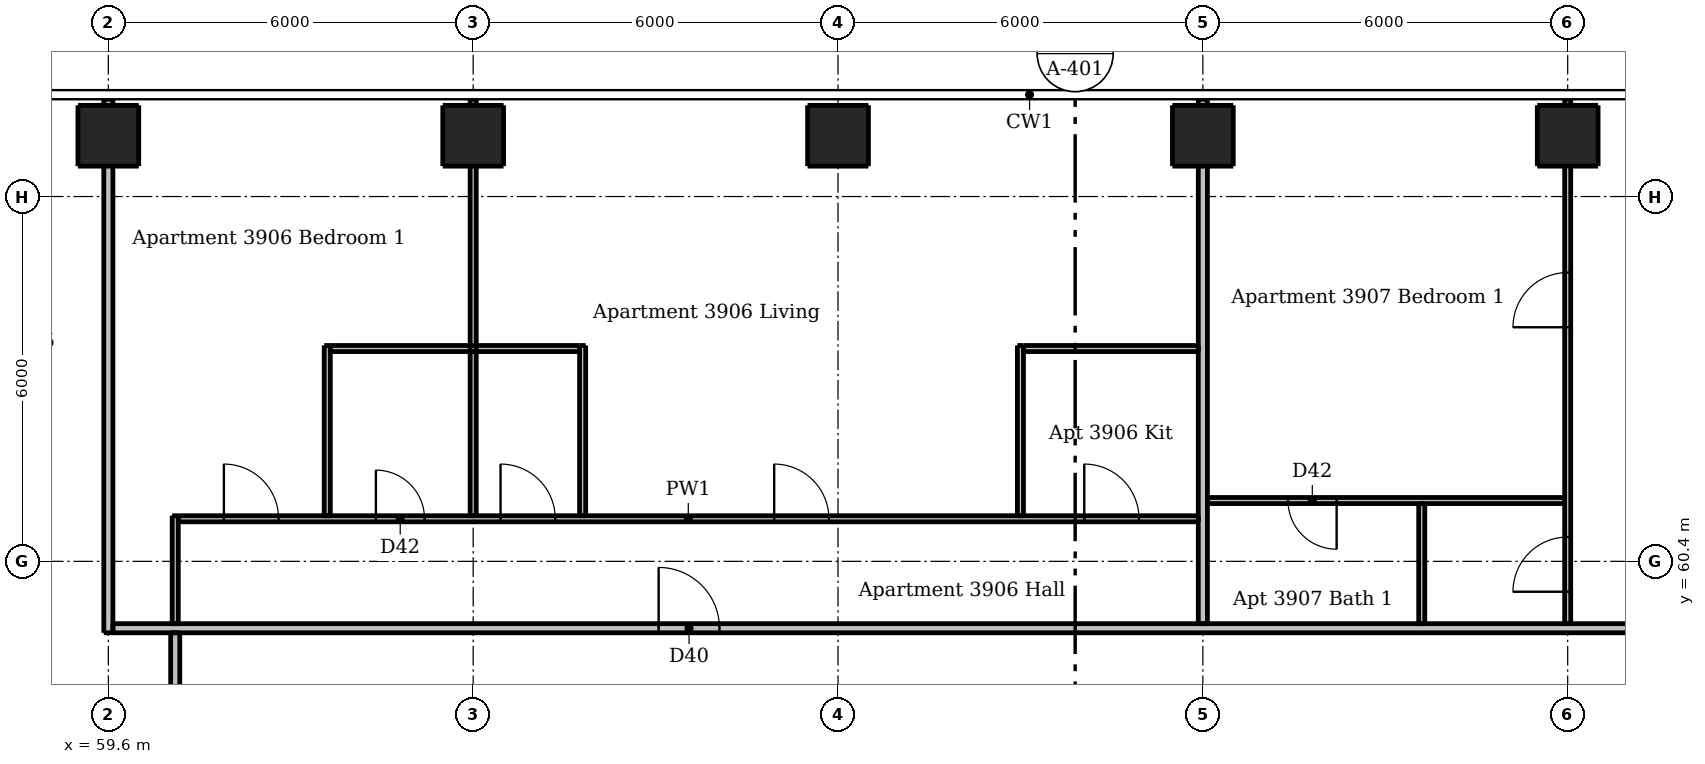
"""IFC4 building model, lengths in metres.
Left out: names, types, materials, properties, quantities, classifications, styles, units other than length and angle.
Written with IfcOpenShell. Run it as: python <this file> out.ifc"""

import sys

from ifc_helpers import new_model, si_unit, direction, frame, frame_2d, origin, origin_2d, place, context, subcontext, project, spatial, rectangle, extrude, element, fill, save


model = new_model("IFC4")
c1 = context("Model", 3, precision=1e-05, world=origin(), true_north=direction((0.0, 1.0)))
c2 = subcontext(c1, "Body", "Model", "MODEL_VIEW")
j1 = project(units=[si_unit("LENGTHUNIT", "METRE"), si_unit("PLANEANGLEUNIT", "RADIAN")], contexts=[c1])
p1 = place(None, origin())
s1 = spatial("IfcSite", under=j1, at=p1, CompositionType="ELEMENT")
p2 = place(p1, origin())
s2 = spatial("IfcBuilding", under=s1, at=p2, CompositionType="ELEMENT")
p3 = place(p2, frame((0.0, 0.0, 147.1)))
s3 = spatial("IfcBuildingStorey", under=s2, at=p3, CompositionType="ELEMENT", Elevation=147.1)
for number, where, z_axis, x_axis in (
    (1, (59.6, 67.4, 0.0), (0.0, 0.0, 1.0), (1.0, 0.0, 0.0)),
    (2, (65.6, 67.4, 0.0), (0.0, 0.0, 1.0), (1.0, 0.0, 0.0)),
    (3, (71.6, 67.4, 0.0), (0.0, 0.0, 1.0), (1.0, 0.0, 0.0)),
    (4, (77.6, 67.4, 0.0), (0.0, 0.0, 1.0), (1.0, 0.0, 0.0)),
    (5, (83.6, 67.4, 0.0), (0.0, 0.0, 1.0), (1.0, 0.0, 0.0)),
):
    element("IfcColumn", number, at=place(p3, frame(where, z_axis=z_axis, x_axis=x_axis)), inside=s3, PredefinedType="COLUMN", context=c2, shape_type="SweptSolid", body=[
        extrude(rectangle(XDim=1.0, YDim=1.0, at=origin_2d()), origin(), (0.0, 0.0, 1.0), 3.0),
    ])
p4 = place(p3, frame((60.7, 59.375, 0.0), z_axis=(0.0, 0.0, 1.0), x_axis=(0.0, 1.0, 0.0)))
e6 = element("IfcWall", 6, at=p4, inside=s3, PredefinedType="PARTITIONING", context=c2, shape_type="SweptSolid", body=[
    extrude(rectangle(XDim=1.775, YDim=0.1, at=frame_2d((0.887, 0.0))), origin(), (0.0, 0.0, 1.0), 3.0),
])
p5 = place(p3, frame((63.2, 61.15, 0.0), z_axis=(0.0, 0.0, 1.0), x_axis=(0.0, 1.0, 0.0)))
e7 = element("IfcWall", 7, at=p5, inside=s3, PredefinedType="PARTITIONING", context=c2, shape_type="SweptSolid", body=[
    extrude(rectangle(XDim=2.8, YDim=0.1, at=frame_2d((1.4, 0.0))), origin(), (0.0, 0.0, 1.0), 3.0),
])
p6 = place(p3, frame((65.6, 61.15, 0.0), z_axis=(0.0, 0.0, 1.0), x_axis=(0.0, 1.0, 0.0)))
e8 = element("IfcWall", 8, at=p6, inside=s3, PredefinedType="PARTITIONING", context=c2, shape_type="SweptSolid", body=[
    extrude(rectangle(XDim=6.85, YDim=0.1, at=frame_2d((3.425, 0.0))), origin(), (0.0, 0.0, 1.0), 2.466),
])
for number, where, z_axis, x_axis in (
    (9, (67.4, 61.15, 0.0), (0.0, 0.0, 1.0), (0.0, 1.0, 0.0)),
    (10, (74.6, 61.15, 0.0), (0.0, 0.0, 1.0), (0.0, 1.0, 0.0)),
):
    element("IfcWall", number, at=place(p3, frame(where, z_axis=z_axis, x_axis=x_axis)), inside=s3, PredefinedType="PARTITIONING", context=c2, shape_type="SweptSolid", body=[
        extrude(rectangle(XDim=2.8, YDim=0.1, at=frame_2d((1.4, 0.0))), origin(), (0.0, 0.0, 1.0), 3.0),
    ])
p7 = place(p3, frame((81.2, 59.375, 0.0), z_axis=(0.0, 0.0, 1.0), x_axis=(0.0, 1.0, 0.0)))
e11 = element("IfcWall", 11, at=p7, inside=s3, PredefinedType="PARTITIONING", context=c2, shape_type="SweptSolid", body=[
    extrude(rectangle(XDim=1.975, YDim=0.1, at=frame_2d((0.988, 0.0))), origin(), (0.0, 0.0, 1.0), 3.0),
])
p8 = place(p3, frame((83.6, 59.375, 0.0), z_axis=(0.0, 0.0, 1.0), x_axis=(0.0, 1.0, 0.0)))
e12 = element("IfcWall", 12, at=p8, inside=s3, PredefinedType="PARTITIONING", context=c2, shape_type="SweptSolid", body=[
    extrude(rectangle(XDim=8.625, YDim=0.1, at=frame_2d((4.312, 0.0))), origin(), (0.0, 0.0, 1.0), 2.466),
])
p9 = place(p8, frame((0.525, 0.0, 0.0)))
e13 = element("IfcOpeningElement", 13, at=p9, cuts=e12, PredefinedType="OPENING", context=c2, shape_type="SweptSolid", body=[
    extrude(rectangle(XDim=0.9, YDim=2.1, at=frame_2d((0.45, 1.05))), frame((0.0, 0.06, 0.0), z_axis=(0.0, -1.0, 0.0), x_axis=(1.0, 0.0, 0.0)), (0.0, 0.0, 1.0), 0.12),
])
p10 = place(p8, frame((4.875, 0.0, 0.0)))
e14 = element("IfcOpeningElement", 14, at=p10, cuts=e12, PredefinedType="OPENING", context=c2, shape_type="SweptSolid", body=[
    extrude(rectangle(XDim=0.9, YDim=2.1, at=frame_2d((0.45, 1.05))), frame((0.0, 0.06, 0.0), z_axis=(0.0, -1.0, 0.0), x_axis=(1.0, 0.0, 0.0)), (0.0, 0.0, 1.0), 0.12),
])
p11 = place(p3, frame((63.25, 63.9, 0.0), z_axis=(0.0, 0.0, 1.0), x_axis=(1.0, 0.0, 0.0)))
e15 = element("IfcWall", 15, at=p11, inside=s3, PredefinedType="PARTITIONING", context=c2, shape_type="SweptSolid", body=[
    extrude(rectangle(XDim=4.1, YDim=0.1, at=frame_2d((2.05, 0.0))), origin(), (0.0, 0.0, 1.0), 3.0),
])
p12 = place(p3, frame((74.65, 63.9, 0.0), z_axis=(0.0, 0.0, 1.0), x_axis=(1.0, 0.0, 0.0)))
e16 = element("IfcWall", 16, at=p12, inside=s3, PredefinedType="PARTITIONING", context=c2, shape_type="SweptSolid", body=[
    extrude(rectangle(XDim=2.875, YDim=0.1, at=frame_2d((1.438, 0.0))), origin(), (0.0, 0.0, 1.0), 3.0),
])
p13 = place(p3, frame((83.55, 61.4, 0.0), z_axis=(0.0, 0.0, 1.0), x_axis=(-1.0, 0.0, 0.0)))
e17 = element("IfcWall", 17, at=p13, inside=s3, PredefinedType="PARTITIONING", context=c2, shape_type="SweptSolid", body=[
    extrude(rectangle(XDim=5.875, YDim=0.1, at=frame_2d((2.938, 0.0))), origin(), (0.0, 0.0, 1.0), 3.0),
])
p14 = place(p13, frame((3.75, 0.0, 0.0)))
e18 = element("IfcOpeningElement", 18, at=p14, cuts=e17, PredefinedType="OPENING", context=c2, shape_type="SweptSolid", body=[
    extrude(rectangle(XDim=0.8, YDim=2.1, at=frame_2d((0.4, 1.05))), frame((0.0, 0.06, 0.0), z_axis=(0.0, -1.0, 0.0), x_axis=(1.0, 0.0, 0.0)), (0.0, 0.0, 1.0), 0.12),
])
p15 = place(p3, frame((60.75, 61.1, 0.0), z_axis=(0.0, 0.0, 1.0), x_axis=(1.0, 0.0, 0.0)))
e19 = element("IfcWall", 19, at=p15, inside=s3, PredefinedType="PARTITIONING", context=c2, shape_type="SweptSolid", body=[
    extrude(rectangle(XDim=16.775, YDim=0.1, at=frame_2d((8.387, 0.0))), origin(), (0.0, 0.0, 1.0), 3.0),
])
p16 = place(p15, frame((9.8, 0.0, 0.0)))
e20 = element("IfcOpeningElement", 20, at=p16, cuts=e19, PredefinedType="OPENING", context=c2, shape_type="SweptSolid", body=[
    extrude(rectangle(XDim=0.9, YDim=2.1, at=frame_2d((0.45, 1.05))), frame((0.0, 0.06, 0.0), z_axis=(0.0, -1.0, 0.0), x_axis=(1.0, 0.0, 0.0)), (0.0, 0.0, 1.0), 0.12),
])
p17 = place(p15, frame((14.9, 0.0, 0.0)))
e21 = element("IfcOpeningElement", 21, at=p17, cuts=e19, PredefinedType="OPENING", context=c2, shape_type="SweptSolid", body=[
    extrude(rectangle(XDim=0.9, YDim=2.1, at=frame_2d((0.45, 1.05))), frame((0.0, 0.06, 0.0), z_axis=(0.0, -1.0, 0.0), x_axis=(1.0, 0.0, 0.0)), (0.0, 0.0, 1.0), 0.12),
])
p18 = place(p15, frame((5.3, 0.0, 0.0)))
e22 = element("IfcOpeningElement", 22, at=p18, cuts=e19, PredefinedType="OPENING", context=c2, shape_type="SweptSolid", body=[
    extrude(rectangle(XDim=0.9, YDim=2.1, at=frame_2d((0.45, 1.05))), frame((0.0, 0.06, 0.0), z_axis=(0.0, -1.0, 0.0), x_axis=(1.0, 0.0, 0.0)), (0.0, 0.0, 1.0), 0.12),
])
p19 = place(p15, frame((0.75, 0.0, 0.0)))
e23 = element("IfcOpeningElement", 23, at=p19, cuts=e19, PredefinedType="OPENING", context=c2, shape_type="SweptSolid", body=[
    extrude(rectangle(XDim=0.9, YDim=2.1, at=frame_2d((0.45, 1.05))), frame((0.0, 0.06, 0.0), z_axis=(0.0, -1.0, 0.0), x_axis=(1.0, 0.0, 0.0)), (0.0, 0.0, 1.0), 0.12),
])
p20 = place(p15, frame((3.25, 0.0, 0.0)))
e24 = element("IfcOpeningElement", 24, at=p20, cuts=e19, PredefinedType="OPENING", context=c2, shape_type="SweptSolid", body=[
    extrude(rectangle(XDim=0.8, YDim=2.1, at=frame_2d((0.4, 1.05))), frame((0.0, 0.06, 0.0), z_axis=(0.0, -1.0, 0.0), x_axis=(1.0, 0.0, 0.0)), (0.0, 0.0, 1.0), 0.12),
])
p21 = place(p3, frame((59.6, 59.225, 0.0), z_axis=(0.0, 0.0, 1.0), x_axis=(0.0, 1.0, 0.0)))
e25 = element("IfcWall", 25, at=p21, inside=s3, PredefinedType="PARTITIONING", context=c2, shape_type="SweptSolid", body=[
    extrude(rectangle(XDim=8.775, YDim=0.15, at=frame_2d((4.387, 0.0))), origin(), (0.0, 0.0, 1.0), 2.46),
])
p22 = place(p3, frame((60.7, 30.325, 0.0), z_axis=(0.0, 0.0, 1.0), x_axis=(0.0, 1.0, 0.0)))
e26 = element("IfcWall", 26, at=p22, inside=s3, PredefinedType="PARTITIONING", context=c2, shape_type="SweptSolid", body=[
    extrude(rectangle(XDim=28.9, YDim=0.15, at=frame_2d((14.45, 0.0))), origin(), (0.0, 0.0, 1.0), 3.0),
])
p23 = place(p22, frame((9.225, 0.0, 0.0)))
e27 = element("IfcOpeningElement", 27, at=p23, cuts=e26, PredefinedType="OPENING", context=c2, shape_type="SweptSolid", body=[
    extrude(rectangle(XDim=1.0, YDim=2.1, at=frame_2d((0.5, 1.05))), frame((0.0, 0.085, 0.0), z_axis=(0.0, -1.0, 0.0), x_axis=(1.0, 0.0, 0.0)), (0.0, 0.0, 1.0), 0.17),
])
p24 = place(p22, frame((26.025, 0.0, 0.0)))
e28 = element("IfcOpeningElement", 28, at=p24, cuts=e26, PredefinedType="OPENING", context=c2, shape_type="SweptSolid", body=[
    extrude(rectangle(XDim=1.0, YDim=2.1, at=frame_2d((0.5, 1.05))), frame((0.0, 0.085, 0.0), z_axis=(0.0, -1.0, 0.0), x_axis=(1.0, 0.0, 0.0)), (0.0, 0.0, 1.0), 0.17),
])
p25 = place(p3, frame((77.6, 59.375, 0.0), z_axis=(0.0, 0.0, 1.0), x_axis=(0.0, 1.0, 0.0)))
e29 = element("IfcWall", 29, at=p25, inside=s3, PredefinedType="PARTITIONING", context=c2, shape_type="SweptSolid", body=[
    extrude(rectangle(XDim=8.625, YDim=0.15, at=frame_2d((4.312, 0.0))), origin(), (0.0, 0.0, 1.0), 2.466),
])
p26 = place(p3, frame((59.675, 59.3, 0.0), z_axis=(0.0, 0.0, 1.0), x_axis=(1.0, 0.0, 0.0)))
e30 = element("IfcWall", 30, at=p26, inside=s3, PredefinedType="PARTITIONING", context=c2, shape_type="SweptSolid", body=[
    extrude(rectangle(XDim=28.55, YDim=0.15, at=frame_2d((14.275, 0.0))), origin(), (0.0, 0.0, 1.0), 3.0),
])
p27 = place(p26, frame((8.975, 0.0, 0.0)))
e31 = element("IfcOpeningElement", 31, at=p27, cuts=e30, PredefinedType="OPENING", context=c2, shape_type="SweptSolid", body=[
    extrude(rectangle(XDim=1.0, YDim=2.1, at=frame_2d((0.5, 1.05))), frame((0.0, 0.085, 0.0), z_axis=(0.0, -1.0, 0.0), x_axis=(1.0, 0.0, 0.0)), (0.0, 0.0, 1.0), 0.17),
])
p28 = place(p26, frame((25.775, 0.0, 0.0)))
e32 = element("IfcOpeningElement", 32, at=p28, cuts=e30, PredefinedType="OPENING", context=c2, shape_type="SweptSolid", body=[
    extrude(rectangle(XDim=1.0, YDim=2.1, at=frame_2d((0.5, 1.05))), frame((0.0, 0.085, 0.0), z_axis=(0.0, -1.0, 0.0), x_axis=(1.0, 0.0, 0.0)), (0.0, 0.0, 1.0), 0.17),
])
p29 = place(p27, origin())
e33 = element("IfcDoor", 33, at=p29, inside=s3, OperationType="SINGLE_SWING_LEFT", PredefinedType="DOOR", context=c2, shape_type="SweptSolid", body=[
    extrude(rectangle(XDim=1.0, YDim=2.1, at=frame_2d((0.5, 1.05))), frame((0.0, 0.025, 0.0), z_axis=(0.0, -1.0, 0.0), x_axis=(1.0, 0.0, 0.0)), (0.0, 0.0, 1.0), 0.05),
])
fill(e31, e33)
p30 = place(p16, origin())
e34 = element("IfcDoor", 34, at=p30, inside=s3, OperationType="SINGLE_SWING_LEFT", PredefinedType="DOOR", context=c2, shape_type="SweptSolid", body=[
    extrude(rectangle(XDim=0.9, YDim=2.1, at=frame_2d((0.45, 1.05))), frame((0.0, 0.025, 0.0), z_axis=(0.0, -1.0, 0.0), x_axis=(1.0, 0.0, 0.0)), (0.0, 0.0, 1.0), 0.05),
])
fill(e20, e34)
p31 = place(p17, origin())
e35 = element("IfcDoor", 35, at=p31, inside=s3, OperationType="SINGLE_SWING_LEFT", PredefinedType="DOOR", context=c2, shape_type="SweptSolid", body=[
    extrude(rectangle(XDim=0.9, YDim=2.1, at=frame_2d((0.45, 1.05))), frame((0.0, 0.025, 0.0), z_axis=(0.0, -1.0, 0.0), x_axis=(1.0, 0.0, 0.0)), (0.0, 0.0, 1.0), 0.05),
])
fill(e21, e35)
p32 = place(p18, origin())
e36 = element("IfcDoor", 36, at=p32, inside=s3, OperationType="SINGLE_SWING_LEFT", PredefinedType="DOOR", context=c2, shape_type="SweptSolid", body=[
    extrude(rectangle(XDim=0.9, YDim=2.1, at=frame_2d((0.45, 1.05))), frame((0.0, 0.025, 0.0), z_axis=(0.0, -1.0, 0.0), x_axis=(1.0, 0.0, 0.0)), (0.0, 0.0, 1.0), 0.05),
])
fill(e22, e36)
p33 = place(p19, origin())
e37 = element("IfcDoor", 37, at=p33, inside=s3, OperationType="SINGLE_SWING_LEFT", PredefinedType="DOOR", context=c2, shape_type="SweptSolid", body=[
    extrude(rectangle(XDim=0.9, YDim=2.1, at=frame_2d((0.45, 1.05))), frame((0.0, 0.025, 0.0), z_axis=(0.0, -1.0, 0.0), x_axis=(1.0, 0.0, 0.0)), (0.0, 0.0, 1.0), 0.05),
])
fill(e23, e37)
p34 = place(p20, origin())
e38 = element("IfcDoor", 38, at=p34, inside=s3, OperationType="SINGLE_SWING_LEFT", PredefinedType="DOOR", context=c2, shape_type="SweptSolid", body=[
    extrude(rectangle(XDim=0.8, YDim=2.1, at=frame_2d((0.4, 1.05))), frame((0.0, 0.025, 0.0), z_axis=(0.0, -1.0, 0.0), x_axis=(1.0, 0.0, 0.0)), (0.0, 0.0, 1.0), 0.05),
])
fill(e24, e38)
p35 = place(p9, origin())
e39 = element("IfcDoor", 39, at=p35, inside=s3, OperationType="SINGLE_SWING_LEFT", PredefinedType="DOOR", context=c2, shape_type="SweptSolid", body=[
    extrude(rectangle(XDim=0.9, YDim=2.1, at=frame_2d((0.45, 1.05))), frame((0.0, 0.025, 0.0), z_axis=(0.0, -1.0, 0.0), x_axis=(1.0, 0.0, 0.0)), (0.0, 0.0, 1.0), 0.05),
])
fill(e13, e39)
p36 = place(p10, origin())
e40 = element("IfcDoor", 40, at=p36, inside=s3, OperationType="SINGLE_SWING_LEFT", PredefinedType="DOOR", context=c2, shape_type="SweptSolid", body=[
    extrude(rectangle(XDim=0.9, YDim=2.1, at=frame_2d((0.45, 1.05))), frame((0.0, 0.025, 0.0), z_axis=(0.0, -1.0, 0.0), x_axis=(1.0, 0.0, 0.0)), (0.0, 0.0, 1.0), 0.05),
])
fill(e14, e40)
p37 = place(p14, origin())
e41 = element("IfcDoor", 41, at=p37, inside=s3, OperationType="SINGLE_SWING_LEFT", PredefinedType="DOOR", context=c2, shape_type="SweptSolid", body=[
    extrude(rectangle(XDim=0.8, YDim=2.1, at=frame_2d((0.4, 1.05))), frame((0.0, 0.025, 0.0), z_axis=(0.0, -1.0, 0.0), x_axis=(1.0, 0.0, 0.0)), (0.0, 0.0, 1.0), 0.05),
])
fill(e18, e41)
save(model, sys.argv[1])
